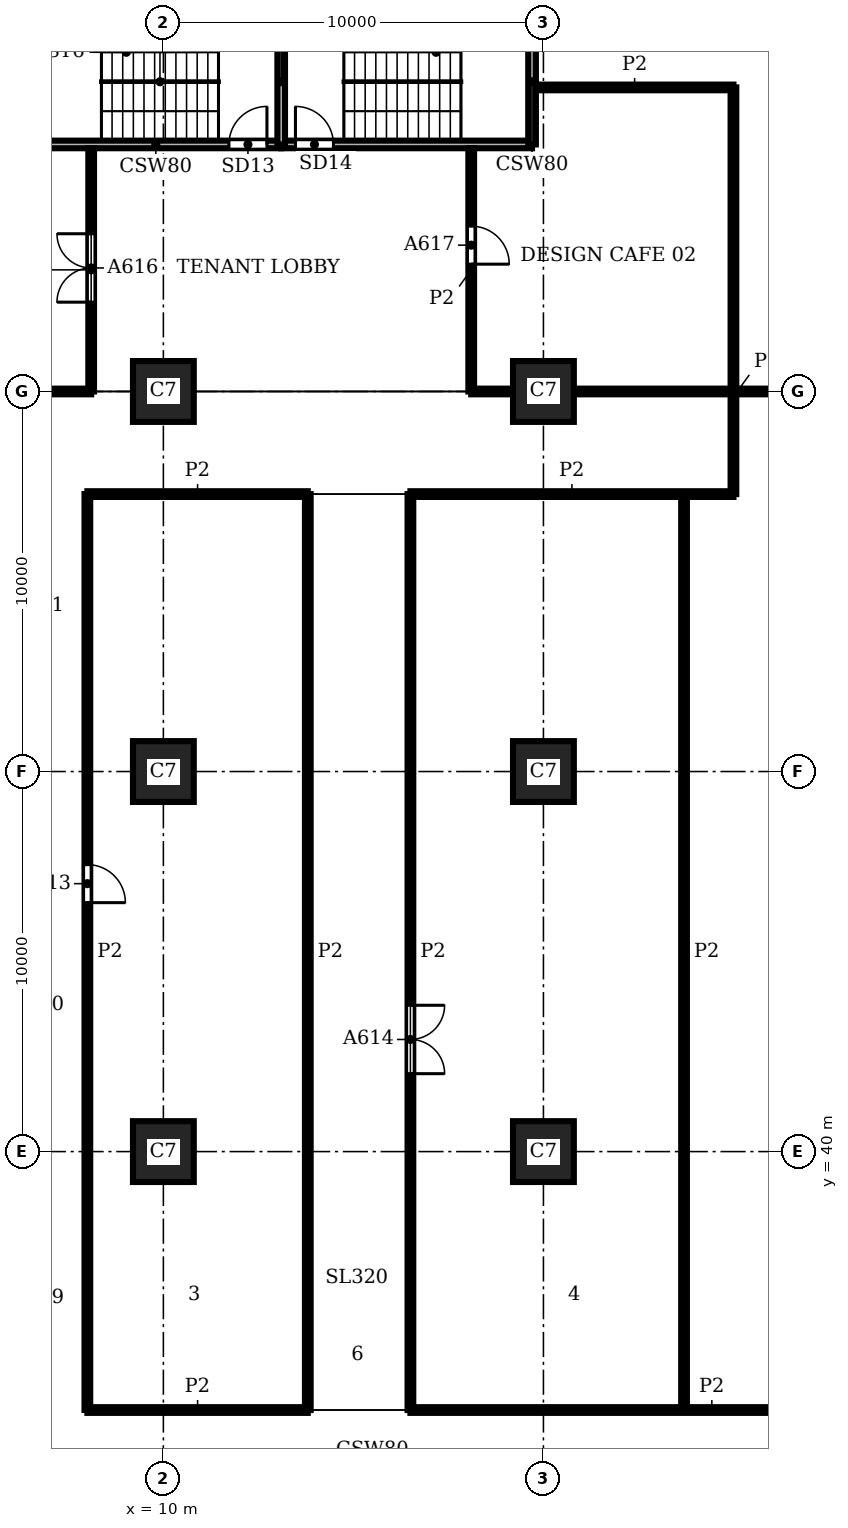
"""IFC4 building model, lengths in metres.
Left out: names, types, materials, properties, quantities, classifications, styles, units other than length and angle.
Written with IfcOpenShell. Run it as: python <this file> out.ifc"""

import sys

from ifc_helpers import new_model, si_unit, direction, frame, frame_2d, origin, origin_2d, place, context, subcontext, project, spatial, rectangle, extrude, element, fill, save


model = new_model("IFC4")
c1 = context("Model", 3, precision=1e-05, world=origin(), true_north=direction((0.0, 1.0)))
c2 = subcontext(c1, "Body", "Model", "MODEL_VIEW")
j1 = project(units=[si_unit("LENGTHUNIT", "METRE"), si_unit("PLANEANGLEUNIT", "RADIAN")], contexts=[c1])
p1 = place(None, origin())
s1 = spatial("IfcSite", under=j1, at=p1, CompositionType="ELEMENT")
p2 = place(p1, origin())
s2 = spatial("IfcBuilding", under=s1, at=p2, CompositionType="ELEMENT")
p3 = place(p2, frame((0.0, 0.0, 70.5)))
s3 = spatial("IfcBuildingStorey", under=s2, at=p3, CompositionType="ELEMENT", Elevation=70.5)
for number, where, z_axis, x_axis in (
    (1, (10.0, 40.0, 0.0), (0.0, 0.0, 1.0), (1.0, 0.0, 0.0)),
    (2, (10.0, 50.0, 0.0), (0.0, 0.0, 1.0), (1.0, 0.0, 0.0)),
    (3, (10.0, 60.0, 0.0), (0.0, 0.0, 1.0), (1.0, 0.0, 0.0)),
    (4, (20.0, 40.0, 0.0), (0.0, 0.0, 1.0), (1.0, 0.0, 0.0)),
    (5, (20.0, 50.0, 0.0), (0.0, 0.0, 1.0), (1.0, 0.0, 0.0)),
    (6, (20.0, 60.0, 0.0), (0.0, 0.0, 1.0), (1.0, 0.0, 0.0)),
):
    element("IfcColumn", number, at=place(p3, frame(where, z_axis=z_axis, x_axis=x_axis)), inside=s3, PredefinedType="COLUMN", context=c2, shape_type="SweptSolid", body=[
        extrude(rectangle(XDim=1.6, YDim=1.6, at=origin_2d()), origin(), (0.0, 0.0, 1.0), 3.9),
    ])
p4 = place(p3, frame((6.5, 66.5, 0.0), z_axis=(0.0, 0.0, 1.0), x_axis=(1.0, 0.0, 0.0)))
e7 = element("IfcWall", 7, at=p4, inside=s3, PredefinedType="SHEAR", context=c2, shape_type="SweptSolid", body=[
    extrude(rectangle(XDim=6.6, YDim=0.2, at=frame_2d((3.3, 0.0))), origin(), (0.0, 0.0, 1.0), 3.58),
])
p5 = place(p4, frame((5.225, 0.0, 0.0)))
e8 = element("IfcOpeningElement", 8, at=p5, cuts=e7, PredefinedType="OPENING", context=c2, shape_type="SweptSolid", body=[
    extrude(rectangle(XDim=1.0, YDim=2.1, at=frame_2d((0.5, 1.05))), frame((0.0, 0.11, 0.0), z_axis=(0.0, -1.0, 0.0), x_axis=(1.0, 0.0, 0.0)), (0.0, 0.0, 1.0), 0.22),
])
p6 = place(p3, frame((13.1, 66.5, 0.0), z_axis=(0.0, 0.0, 1.0), x_axis=(1.0, 0.0, 0.0)))
e9 = element("IfcWall", 9, at=p6, inside=s3, PredefinedType="SHEAR", context=c2, shape_type="SweptSolid", body=[
    extrude(rectangle(XDim=6.6, YDim=0.2, at=frame_2d((3.3, 0.0))), origin(), (0.0, 0.0, 1.0), 3.58),
])
p7 = place(p6, frame((0.375, 0.0, 0.0)))
e10 = element("IfcOpeningElement", 10, at=p7, cuts=e9, PredefinedType="OPENING", context=c2, shape_type="SweptSolid", body=[
    extrude(rectangle(XDim=1.0, YDim=2.1, at=frame_2d((0.5, 1.05))), frame((0.0, 0.11, 0.0), z_axis=(0.0, -1.0, 0.0), x_axis=(1.0, 0.0, 0.0)), (0.0, 0.0, 1.0), 0.22),
])
for number, where, z_axis, x_axis in (
    (11, (13.1, 66.5, 0.0), (0.0, 0.0, 1.0), (0.0, 1.0, 0.0)),
    (12, (19.7, 66.5, 0.0), (0.0, 0.0, 1.0), (0.0, 1.0, 0.0)),
):
    element("IfcWall", number, at=place(p3, frame(where, z_axis=z_axis, x_axis=x_axis)), inside=s3, PredefinedType="SHEAR", context=c2, shape_type="SweptSolid", body=[
        extrude(rectangle(XDim=3.3, YDim=0.2, at=frame_2d((1.65, 0.0))), origin(), (0.0, 0.0, 1.0), 3.58),
    ])
p8 = place(p3, frame((8.0, 33.2, 0.0), z_axis=(0.0, 0.0, 1.0), x_axis=(0.0, 1.0, 0.0)))
e13 = element("IfcWall", 13, at=p8, inside=s3, PredefinedType="PARTITIONING", context=c2, shape_type="SweptSolid", body=[
    extrude(rectangle(XDim=24.1, YDim=0.15, at=frame_2d((12.05, 0.0))), origin(), (0.0, 0.0, 1.0), 3.58),
])
p9 = place(p8, frame((13.35, 0.0, 0.0)))
e14 = element("IfcOpeningElement", 14, at=p9, cuts=e13, PredefinedType="OPENING", context=c2, shape_type="SweptSolid", body=[
    extrude(rectangle(XDim=1.0, YDim=2.1, at=frame_2d((0.5, 1.05))), frame((0.0, 0.085, 0.0), z_axis=(0.0, -1.0, 0.0), x_axis=(1.0, 0.0, 0.0)), (0.0, 0.0, 1.0), 0.17),
])
p10 = place(p3, frame((8.1, 60.0, 0.0), z_axis=(0.0, 0.0, 1.0), x_axis=(0.0, 1.0, 0.0)))
e15 = element("IfcWall", 15, at=p10, inside=s3, PredefinedType="PARTITIONING", context=c2, shape_type="SweptSolid", body=[
    extrude(rectangle(XDim=6.4, YDim=0.15, at=frame_2d((3.2, 0.0))), origin(), (0.0, 0.0, 1.0), 3.58),
])
p11 = place(p10, frame((2.35, 0.0, 0.0)))
e16 = element("IfcOpeningElement", 16, at=p11, cuts=e15, PredefinedType="OPENING", context=c2, shape_type="SweptSolid", body=[
    extrude(rectangle(XDim=1.8, YDim=2.1, at=frame_2d((0.9, 1.05))), frame((0.0, 0.085, 0.0), z_axis=(0.0, -1.0, 0.0), x_axis=(1.0, 0.0, 0.0)), (0.0, 0.0, 1.0), 0.17),
])
p12 = place(p3, frame((13.8, 33.2, 0.0), z_axis=(0.0, 0.0, 1.0), x_axis=(0.0, 1.0, 0.0)))
e17 = element("IfcWall", 17, at=p12, inside=s3, PredefinedType="PARTITIONING", context=c2, shape_type="SweptSolid", body=[
    extrude(rectangle(XDim=24.1, YDim=0.15, at=frame_2d((12.05, 0.0))), origin(), (0.0, 0.0, 1.0), 3.58),
])
p13 = place(p3, frame((16.5, 33.2, 0.0), z_axis=(0.0, 0.0, 1.0), x_axis=(0.0, 1.0, 0.0)))
e18 = element("IfcWall", 18, at=p13, inside=s3, PredefinedType="PARTITIONING", context=c2, shape_type="SweptSolid", body=[
    extrude(rectangle(XDim=24.1, YDim=0.15, at=frame_2d((12.05, 0.0))), origin(), (0.0, 0.0, 1.0), 3.58),
])
p14 = place(p13, frame((8.85, 0.0, 0.0)))
e19 = element("IfcOpeningElement", 19, at=p14, cuts=e18, PredefinedType="OPENING", context=c2, shape_type="SweptSolid", body=[
    extrude(rectangle(XDim=1.8, YDim=2.1, at=frame_2d((0.9, 1.05))), frame((0.0, 0.085, 0.0), z_axis=(0.0, -1.0, 0.0), x_axis=(1.0, 0.0, 0.0)), (0.0, 0.0, 1.0), 0.17),
])
p15 = place(p3, frame((18.1, 60.0, 0.0), z_axis=(0.0, 0.0, 1.0), x_axis=(0.0, 1.0, 0.0)))
e20 = element("IfcWall", 20, at=p15, inside=s3, PredefinedType="PARTITIONING", context=c2, shape_type="SweptSolid", body=[
    extrude(rectangle(XDim=6.4, YDim=0.15, at=frame_2d((3.2, 0.0))), origin(), (0.0, 0.0, 1.0), 3.58),
])
p16 = place(p15, frame((3.35, 0.0, 0.0)))
e21 = element("IfcOpeningElement", 21, at=p16, cuts=e20, PredefinedType="OPENING", context=c2, shape_type="SweptSolid", body=[
    extrude(rectangle(XDim=1.0, YDim=2.1, at=frame_2d((0.5, 1.05))), frame((0.0, 0.085, 0.0), z_axis=(0.0, -1.0, 0.0), x_axis=(1.0, 0.0, 0.0)), (0.0, 0.0, 1.0), 0.17),
])
p17 = place(p3, frame((23.7, 33.2, 0.0), z_axis=(0.0, 0.0, 1.0), x_axis=(0.0, 1.0, 0.0)))
e22 = element("IfcWall", 22, at=p17, inside=s3, PredefinedType="PARTITIONING", context=c2, shape_type="SweptSolid", body=[
    extrude(rectangle(XDim=24.1, YDim=0.15, at=frame_2d((12.05, 0.0))), origin(), (0.0, 0.0, 1.0), 3.58),
])
p18 = place(p3, frame((25.0, 57.3, 0.0), z_axis=(0.0, 0.0, 1.0), x_axis=(0.0, 1.0, 0.0)))
e23 = element("IfcWall", 23, at=p18, inside=s3, PredefinedType="PARTITIONING", context=c2, shape_type="SweptSolid", body=[
    extrude(rectangle(XDim=10.7, YDim=0.15, at=frame_2d((5.35, 0.0))), origin(), (0.0, 0.0, 1.0), 3.58),
])
p19 = place(p3, frame((8.0, 33.2, 0.0), z_axis=(0.0, 0.0, 1.0), x_axis=(1.0, 0.0, 0.0)))
e24 = element("IfcWall", 24, at=p19, inside=s3, PredefinedType="PARTITIONING", context=c2, shape_type="SweptSolid", body=[
    extrude(rectangle(XDim=5.8, YDim=0.15, at=frame_2d((2.9, 0.0))), origin(), (0.0, 0.0, 1.0), 3.58),
])
p20 = place(p3, frame((16.5, 33.2, 0.0), z_axis=(0.0, 0.0, 1.0), x_axis=(1.0, 0.0, 0.0)))
e25 = element("IfcWall", 25, at=p20, inside=s3, PredefinedType="PARTITIONING", context=c2, shape_type="SweptSolid", body=[
    extrude(rectangle(XDim=15.862, YDim=0.15, at=frame_2d((7.931, 0.0))), origin(), (0.0, 0.0, 1.0), 3.58),
])
p21 = place(p20, frame((10.05, 0.0, 0.0)))
e26 = element("IfcOpeningElement", 26, at=p21, cuts=e25, PredefinedType="OPENING", context=c2, shape_type="SweptSolid", body=[
    extrude(rectangle(XDim=1.8, YDim=2.1, at=frame_2d((0.9, 1.05))), frame((0.0, 0.085, 0.0), z_axis=(0.0, -1.0, 0.0), x_axis=(1.0, 0.0, 0.0)), (0.0, 0.0, 1.0), 0.17),
])
p22 = place(p20, frame((14.45, 0.0, 0.0)))
e27 = element("IfcOpeningElement", 27, at=p22, cuts=e25, PredefinedType="OPENING", context=c2, shape_type="SweptSolid", body=[
    extrude(rectangle(XDim=1.0, YDim=2.1, at=frame_2d((0.5, 1.05))), frame((0.0, 0.085, 0.0), z_axis=(0.0, -1.0, 0.0), x_axis=(1.0, 0.0, 0.0)), (0.0, 0.0, 1.0), 0.17),
])
p23 = place(p3, frame((8.0, 57.3, 0.0), z_axis=(0.0, 0.0, 1.0), x_axis=(1.0, 0.0, 0.0)))
e28 = element("IfcWall", 28, at=p23, inside=s3, PredefinedType="PARTITIONING", context=c2, shape_type="SweptSolid", body=[
    extrude(rectangle(XDim=5.8, YDim=0.15, at=frame_2d((2.9, 0.0))), origin(), (0.0, 0.0, 1.0), 3.58),
])
p24 = place(p3, frame((16.5, 57.3, 0.0), z_axis=(0.0, 0.0, 1.0), x_axis=(1.0, 0.0, 0.0)))
e29 = element("IfcWall", 29, at=p24, inside=s3, PredefinedType="PARTITIONING", context=c2, shape_type="SweptSolid", body=[
    extrude(rectangle(XDim=8.5, YDim=0.15, at=frame_2d((4.25, 0.0))), origin(), (0.0, 0.0, 1.0), 3.58),
])
p25 = place(p3, frame((0.6, 60.0, 0.0), z_axis=(0.0, 0.0, 1.0), x_axis=(1.0, 0.0, 0.0)))
e30 = element("IfcWall", 30, at=p25, inside=s3, PredefinedType="PARTITIONING", context=c2, shape_type="SweptSolid", body=[
    extrude(rectangle(XDim=7.5, YDim=0.15, at=frame_2d((3.75, 0.0))), origin(), (0.0, 0.0, 1.0), 3.58),
])
p26 = place(p3, frame((18.1, 60.0, 0.0), z_axis=(0.0, 0.0, 1.0), x_axis=(1.0, 0.0, 0.0)))
e31 = element("IfcWall", 31, at=p26, inside=s3, PredefinedType="PARTITIONING", context=c2, shape_type="SweptSolid", body=[
    extrude(rectangle(XDim=1.1, YDim=0.15, at=frame_2d((0.55, 0.0))), origin(), (0.0, 0.0, 1.0), 3.58),
])
p27 = place(p3, frame((20.8, 60.0, 0.0), z_axis=(0.0, 0.0, 1.0), x_axis=(1.0, 0.0, 0.0)))
e32 = element("IfcWall", 32, at=p27, inside=s3, PredefinedType="PARTITIONING", context=c2, shape_type="SweptSolid", body=[
    extrude(rectangle(XDim=8.6, YDim=0.15, at=frame_2d((4.3, 0.0))), origin(), (0.0, 0.0, 1.0), 3.58),
])
p28 = place(p3, frame((19.8, 68.0, 0.0), z_axis=(0.0, 0.0, 1.0), x_axis=(1.0, 0.0, 0.0)))
e33 = element("IfcWall", 33, at=p28, inside=s3, PredefinedType="PARTITIONING", context=c2, shape_type="SweptSolid", body=[
    extrude(rectangle(XDim=5.2, YDim=0.15, at=frame_2d((2.6, 0.0))), origin(), (0.0, 0.0, 1.0), 3.58),
])
p29 = place(p5, origin())
e34 = element("IfcDoor", 34, at=p29, inside=s3, OperationType="SINGLE_SWING_RIGHT", PredefinedType="DOOR", context=c2, shape_type="SweptSolid", body=[
    extrude(rectangle(XDim=1.0, YDim=2.1, at=frame_2d((0.5, 1.05))), frame((0.0, 0.025, 0.0), z_axis=(0.0, -1.0, 0.0), x_axis=(1.0, 0.0, 0.0)), (0.0, 0.0, 1.0), 0.05),
])
fill(e8, e34)
p30 = place(p7, origin())
e35 = element("IfcDoor", 35, at=p30, inside=s3, OperationType="SINGLE_SWING_LEFT", PredefinedType="DOOR", context=c2, shape_type="SweptSolid", body=[
    extrude(rectangle(XDim=1.0, YDim=2.1, at=frame_2d((0.5, 1.05))), frame((0.0, 0.025, 0.0), z_axis=(0.0, -1.0, 0.0), x_axis=(1.0, 0.0, 0.0)), (0.0, 0.0, 1.0), 0.05),
])
fill(e10, e35)
p31 = place(p9, frame((1.0, 0.0, 0.0), z_axis=(0.0, 0.0, 1.0), x_axis=(-1.0, 0.0, 0.0)))
e36 = element("IfcDoor", 36, at=p31, inside=s3, OperationType="SINGLE_SWING_RIGHT", PredefinedType="DOOR", context=c2, shape_type="SweptSolid", body=[
    extrude(rectangle(XDim=1.0, YDim=2.1, at=frame_2d((0.5, 1.05))), frame((0.0, 0.025, 0.0), z_axis=(0.0, -1.0, 0.0), x_axis=(1.0, 0.0, 0.0)), (0.0, 0.0, 1.0), 0.05),
])
fill(e14, e36)
p32 = place(p14, frame((1.8, 0.0, 0.0), z_axis=(0.0, 0.0, 1.0), x_axis=(-1.0, 0.0, 0.0)))
e37 = element("IfcDoor", 37, at=p32, inside=s3, OperationType="DOUBLE_DOOR_SINGLE_SWING", PredefinedType="DOOR", context=c2, shape_type="SweptSolid", body=[
    extrude(rectangle(XDim=1.8, YDim=2.1, at=frame_2d((0.9, 1.05))), frame((0.0, 0.025, 0.0), z_axis=(0.0, -1.0, 0.0), x_axis=(1.0, 0.0, 0.0)), (0.0, 0.0, 1.0), 0.05),
])
fill(e19, e37)
p33 = place(p11, origin())
e38 = element("IfcDoor", 38, at=p33, inside=s3, OperationType="DOUBLE_DOOR_SINGLE_SWING", PredefinedType="DOOR", context=c2, shape_type="SweptSolid", body=[
    extrude(rectangle(XDim=1.8, YDim=2.1, at=frame_2d((0.9, 1.05))), frame((0.0, 0.025, 0.0), z_axis=(0.0, -1.0, 0.0), x_axis=(1.0, 0.0, 0.0)), (0.0, 0.0, 1.0), 0.05),
])
fill(e16, e38)
p34 = place(p16, frame((1.0, 0.0, 0.0), z_axis=(0.0, 0.0, 1.0), x_axis=(-1.0, 0.0, 0.0)))
e39 = element("IfcDoor", 39, at=p34, inside=s3, OperationType="SINGLE_SWING_RIGHT", PredefinedType="DOOR", context=c2, shape_type="SweptSolid", body=[
    extrude(rectangle(XDim=1.0, YDim=2.1, at=frame_2d((0.5, 1.05))), frame((0.0, 0.025, 0.0), z_axis=(0.0, -1.0, 0.0), x_axis=(1.0, 0.0, 0.0)), (0.0, 0.0, 1.0), 0.05),
])
fill(e21, e39)
save(model, sys.argv[1])
